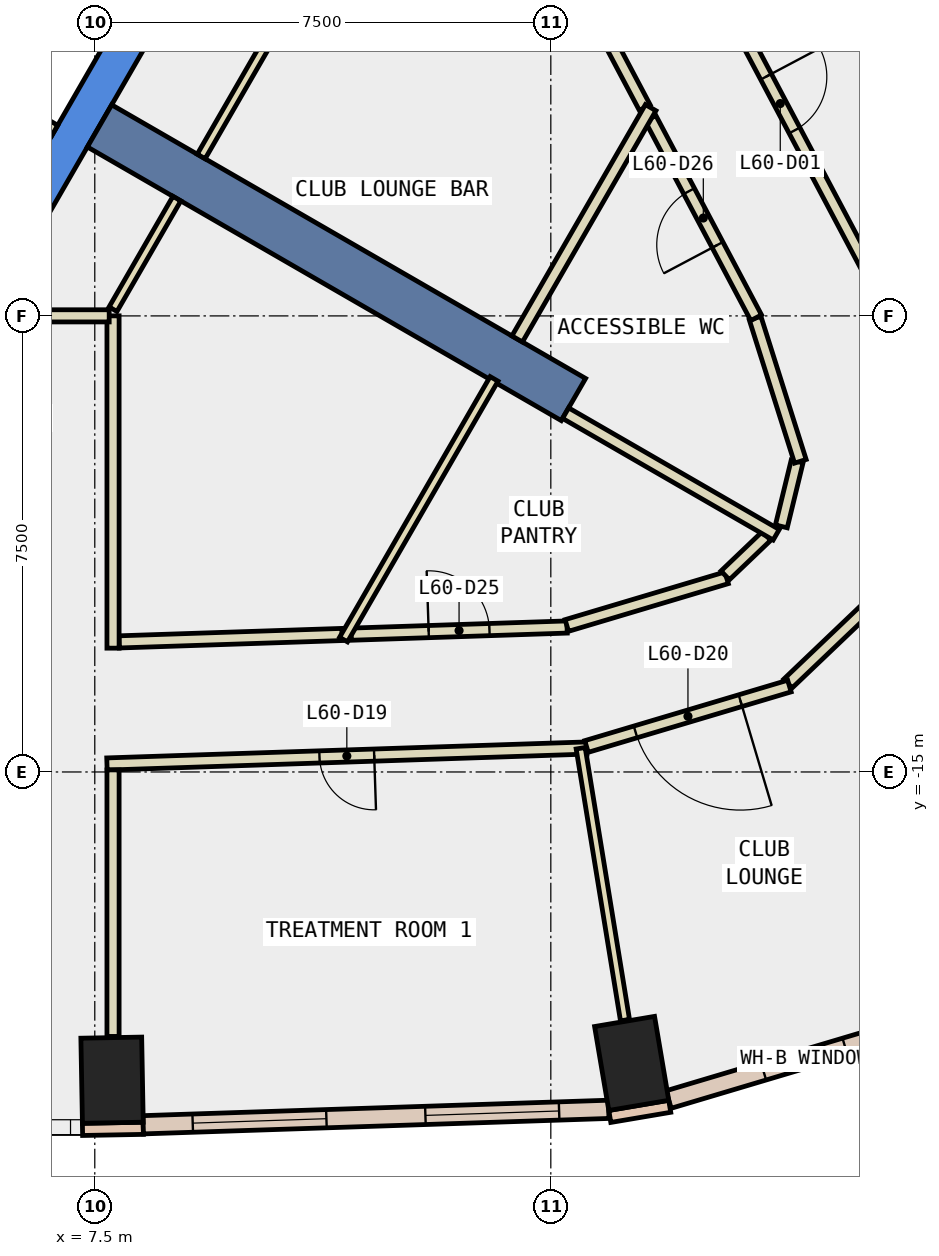
"""IFC4 building model, lengths in metres.
Left out: names, types, materials, properties, quantities, classifications, styles, units other than length and angle.
Written with IfcOpenShell. Run it as: python <this file> out.ifc"""

import sys

from ifc_helpers import new_model, si_unit, direction, frame, frame_2d, origin, origin_2d, place, context, subcontext, project, spatial, polyline, rectangle, outline, extrude, element, fill, save


model = new_model("IFC4")
c1 = context("Model", 3, precision=1e-05, world=origin(), true_north=direction((0.0, 1.0)))
c2 = subcontext(c1, "Body", "Model", "MODEL_VIEW")
j1 = project(units=[si_unit("LENGTHUNIT", "METRE"), si_unit("PLANEANGLEUNIT", "RADIAN")], contexts=[c1])
p1 = place(None, origin())
s1 = spatial("IfcSite", under=j1, at=p1, CompositionType="ELEMENT")
p2 = place(p1, origin())
s2 = spatial("IfcBuilding", under=s1, at=p2, CompositionType="ELEMENT")
p3 = place(p2, frame((0.0, 0.0, 263.0)))
s3 = spatial("IfcBuildingStorey", under=s2, at=p3, CompositionType="ELEMENT", Elevation=263.0)
for number, where, z_axis, x_axis in (
    (1, (7.784, -20.069, -0.34), (0.0, 0.0, 1.0), (1.0, 0.018, 0.0)),
    (2, (16.33, -19.793, -0.34), (0.0, 0.0, 1.0), (0.986, 0.167, 0.0)),
):
    element("IfcColumn", number, at=place(p3, frame(where, z_axis=z_axis, x_axis=x_axis)), inside=s3, PredefinedType="COLUMN", context=c2, shape_type="SweptSolid", body=[
        extrude(rectangle(XDim=1.0, YDim=1.4, at=origin_2d()), origin(), (0.0, 0.0, 1.0), 3.6),
    ])
p4 = place(p3, frame((0.0, 0.0, -0.34)))
e3 = element("IfcWall", 3, at=p4, inside=s3, PredefinedType="SHEAR", context=c2, shape_type="SweptSolid", body=[
    extrude(outline(polyline([(5.774, -7.5), (11.547, 2.5), (10.854, 2.5), (5.427, -6.9), (5.774, -7.5)])), origin(), (0.0, 0.0, 1.0), 3.6),
])
p5 = place(p3, frame((7.578, -4.375, -0.34), z_axis=(0.0, 0.0, 1.0), x_axis=(0.866024315419, -0.5000018851, 0.0)))
e4 = element("IfcWall", 4, at=p5, inside=s3, PredefinedType="SHEAR", context=c2, shape_type="SweptSolid", body=[
    extrude(rectangle(XDim=9.0, YDim=0.8, at=frame_2d((4.5, 0.0))), origin(), (0.0, 0.0, 1.0), 3.6),
])
for number, where, z_axis, x_axis in (
    (5, (7.298, -20.878, 0.0), (0.0, 0.0, 1.0), (1.0, 0.018, 0.0)),
    (6, (15.97, -20.665, 0.0), (0.0, 0.0, 1.0), (0.986, 0.167, 0.0)),
):
    element("IfcWall", number, at=place(p3, frame(where, z_axis=z_axis, x_axis=x_axis)), inside=s3, PredefinedType="STANDARD", context=c2, shape_type="SweptSolid", body=[
        extrude(rectangle(XDim=1.0, YDim=0.2, at=frame_2d((0.5, 0.0))), origin(), (0.0, 0.0, 1.0), 3.26),
    ])
p6 = place(p3, frame((8.296, -20.802, 0.0), z_axis=(0.0, 0.0, 1.0), x_axis=(0.999450376985, 0.033150323459, 0.0)))
e7 = element("IfcWall", 7, at=p6, inside=s3, PredefinedType="STANDARD", context=c2, shape_type="SweptSolid", body=[
    extrude(rectangle(XDim=7.659, YDim=0.3, at=frame_2d((3.83, 0.0))), origin(), (0.0, 0.0, 1.0), 3.26),
])
p7 = place(p6, frame((0.815, 0.0, 0.9)))
e8 = element("IfcOpeningElement", 8, at=p7, cuts=e7, PredefinedType="OPENING", context=c2, shape_type="SweptSolid", body=[
    extrude(rectangle(XDim=2.2, YDim=2.0, at=frame_2d((1.1, 1.0))), frame((0.0, 0.16, 0.0), z_axis=(0.0, -1.0, 0.0), x_axis=(1.0, 0.0, 0.0)), (0.0, 0.0, 1.0), 0.32),
])
p8 = place(p6, frame((4.644, 0.0, 0.9)))
e9 = element("IfcOpeningElement", 9, at=p8, cuts=e7, PredefinedType="OPENING", context=c2, shape_type="SweptSolid", body=[
    extrude(rectangle(XDim=2.2, YDim=2.0, at=frame_2d((1.1, 1.0))), frame((0.0, 0.16, 0.0), z_axis=(0.0, -1.0, 0.0), x_axis=(1.0, 0.0, 0.0)), (0.0, 0.0, 1.0), 0.32),
])
p9 = place(p3, frame((16.937, -20.387, 0.0), z_axis=(0.0, 0.0, 1.0), x_axis=(0.958361270465, 0.285558532131, 0.0)))
e10 = element("IfcWall", 10, at=p9, inside=s3, PredefinedType="STANDARD", context=c2, shape_type="SweptSolid", body=[
    extrude(rectangle(XDim=4.658, YDim=0.3, at=frame_2d((2.329, 0.0))), origin(), (0.0, 0.0, 1.0), 3.26),
])
p10 = place(p9, frame((1.629, 0.0, 0.9)))
e11 = element("IfcOpeningElement", 11, at=p10, cuts=e10, PredefinedType="OPENING", context=c2, shape_type="SweptSolid", body=[
    extrude(rectangle(XDim=1.4, YDim=2.0, at=frame_2d((0.7, 1.0))), frame((0.0, 0.16, 0.0), z_axis=(0.0, -1.0, 0.0), x_axis=(1.0, 0.0, 0.0)), (0.0, 0.0, 1.0), 0.32),
])
p11 = place(p3, frame((7.9, -12.861, 0.0), z_axis=(0.0, 0.0, 1.0), x_axis=(0.999446088303, 0.033279371614, 0.0)))
e12 = element("IfcWall", 12, at=p11, inside=s3, PredefinedType="PARTITIONING", context=c2, shape_type="SweptSolid", body=[
    extrude(rectangle(XDim=3.668, YDim=0.2, at=frame_2d((1.834, 0.0))), origin(), (0.0, 0.0, 1.0), 3.26),
])
p12 = place(p3, frame((16.545, -4.074, 0.0), z_axis=(0.0, 0.0, 1.0), x_axis=(-0.468321873419, 0.883557934081, 0.0)))
e13 = element("IfcWall", 13, at=p12, inside=s3, PredefinedType="PARTITIONING", context=c2, shape_type="SweptSolid", body=[
    extrude(rectangle(XDim=2.093, YDim=0.2, at=frame_2d((1.046, 0.0))), origin(), (0.0, 0.0, 1.0), 3.26),
])
p13 = place(p3, frame((11.716, -12.734, 0.0), z_axis=(0.0, 0.0, 1.0), x_axis=(0.999449093602, 0.03318899362, 0.0)))
e14 = element("IfcWall", 14, at=p13, inside=s3, PredefinedType="PARTITIONING", context=c2, shape_type="SweptSolid", body=[
    extrude(rectangle(XDim=3.553, YDim=0.2, at=frame_2d((1.776, 0.0))), origin(), (0.0, 0.0, 1.0), 3.26),
])
p14 = place(p13, frame((1.276, 0.0, 0.0)))
e15 = element("IfcOpeningElement", 15, at=p14, cuts=e14, PredefinedType="OPENING", context=c2, shape_type="SweptSolid", body=[
    extrude(rectangle(XDim=1.0, YDim=2.1, at=frame_2d((0.5, 1.05))), frame((0.0, 0.11, 0.0), z_axis=(0.0, -1.0, 0.0), x_axis=(1.0, 0.0, 0.0)), (0.0, 0.0, 1.0), 0.22),
])
p15 = place(p3, frame((15.263, -12.591, 0.0), z_axis=(0.0, 0.0, 1.0), x_axis=(0.958253964342, 0.285918414628, 0.0)))
e16 = element("IfcWall", 16, at=p15, inside=s3, PredefinedType="PARTITIONING", context=c2, shape_type="SweptSolid", body=[
    extrude(rectangle(XDim=2.743, YDim=0.2, at=frame_2d((1.371, 0.0))), origin(), (0.0, 0.0, 1.0), 3.26),
])
p16 = place(p3, frame((17.868, -11.767, 0.0), z_axis=(0.0, 0.0, 1.0), x_axis=(0.723402701671, 0.690426340181, 0.0)))
e17 = element("IfcWall", 17, at=p16, inside=s3, PredefinedType="PARTITIONING", context=c2, shape_type="SweptSolid", body=[
    extrude(rectangle(XDim=0.94, YDim=0.2, at=frame_2d((0.47, 0.0))), origin(), (0.0, 0.0, 1.0), 3.26),
])
p17 = place(p3, frame((18.791, -10.961, 0.0), z_axis=(0.0, 0.0, 1.0), x_axis=(0.236572634589, 0.971613806285, 0.0)))
e18 = element("IfcWall", 18, at=p17, inside=s3, PredefinedType="PARTITIONING", context=c2, shape_type="SweptSolid", body=[
    extrude(rectangle(XDim=1.099, YDim=0.2, at=frame_2d((0.55, 0.0))), origin(), (0.0, 0.0, 1.0), 3.26),
])
p18 = place(p3, frame((19.104, -9.891, 0.0), z_axis=(0.0, 0.0, 1.0), x_axis=(-0.301325410186, 0.953521366922, 0.0)))
e19 = element("IfcWall", 19, at=p18, inside=s3, PredefinedType="PARTITIONING", context=c2, shape_type="SweptSolid", body=[
    extrude(rectangle(XDim=2.469, YDim=0.2, at=frame_2d((1.234, 0.0))), origin(), (0.0, 0.0, 1.0), 3.26),
])
p19 = place(p3, frame((18.377, -7.53, 0.0), z_axis=(0.0, 0.0, 1.0), x_axis=(-0.468214048123, 0.883615077474, 0.0)))
e20 = element("IfcWall", 20, at=p19, inside=s3, PredefinedType="PARTITIONING", context=c2, shape_type="SweptSolid", body=[
    extrude(rectangle(XDim=3.712, YDim=0.2, at=frame_2d((1.856, 0.0))), origin(), (0.0, 0.0, 1.0), 3.26),
])
p20 = place(p19, frame((1.356, 0.0, 0.0)))
e21 = element("IfcOpeningElement", 21, at=p20, cuts=e20, PredefinedType="OPENING", context=c2, shape_type="SweptSolid", body=[
    extrude(rectangle(XDim=1.0, YDim=2.1, at=frame_2d((0.5, 1.05))), frame((0.0, 0.11, 0.0), z_axis=(0.0, -1.0, 0.0), x_axis=(1.0, 0.0, 0.0)), (0.0, 0.0, 1.0), 0.22),
])
p21 = place(p3, frame((15.591, -14.606, 0.0), z_axis=(0.0, 0.0, 1.0), x_axis=(-0.999445318732, -0.03330247535, 0.0)))
e22 = element("IfcWall", 22, at=p21, inside=s3, PredefinedType="PARTITIONING", context=c2, shape_type="SweptSolid", body=[
    extrude(rectangle(XDim=7.896, YDim=0.2, at=frame_2d((3.948, 0.0))), origin(), (0.0, 0.0, 1.0), 3.26),
])
p22 = place(p21, frame((3.498, 0.0, 0.0)))
e23 = element("IfcOpeningElement", 23, at=p22, cuts=e22, PredefinedType="OPENING", context=c2, shape_type="SweptSolid", body=[
    extrude(rectangle(XDim=0.9, YDim=2.1, at=frame_2d((0.45, 1.05))), frame((0.0, 0.11, 0.0), z_axis=(0.0, -1.0, 0.0), x_axis=(1.0, 0.0, 0.0)), (0.0, 0.0, 1.0), 0.22),
])
p23 = place(p3, frame((20.692, -11.837, 0.0), z_axis=(0.0, 0.0, 1.0), x_axis=(-0.723668833869, -0.690147389248, 0.0)))
e24 = element("IfcWall", 24, at=p23, inside=s3, PredefinedType="PARTITIONING", context=c2, shape_type="SweptSolid", body=[
    extrude(rectangle(XDim=2.476, YDim=0.2, at=frame_2d((1.238, 0.0))), origin(), (0.0, 0.0, 1.0), 3.26),
])
p24 = place(p3, frame((18.924, -13.587, 0.0), z_axis=(0.0, 0.0, 1.0), x_axis=(-0.958378336681, -0.285501250052, 0.0)))
e25 = element("IfcWall", 25, at=p24, inside=s3, PredefinedType="PARTITIONING", context=c2, shape_type="SweptSolid", body=[
    extrude(rectangle(XDim=3.482, YDim=0.2, at=frame_2d((1.741, 0.0))), origin(), (0.0, 0.0, 1.0), 3.26),
])
p25 = place(p24, frame((0.841, 0.0, 0.0)))
e26 = element("IfcOpeningElement", 26, at=p25, cuts=e25, PredefinedType="OPENING", context=c2, shape_type="SweptSolid", body=[
    extrude(rectangle(XDim=1.8, YDim=2.1, at=frame_2d((0.9, 1.05))), frame((0.0, 0.11, 0.0), z_axis=(0.0, -1.0, 0.0), x_axis=(1.0, 0.0, 0.0)), (0.0, 0.0, 1.0), 0.22),
])
p26 = place(p3, frame((17.318, -1.262, 0.0), z_axis=(0.0, 0.0, 1.0), x_axis=(0.468313568794, -0.883562335822, 0.0)))
e27 = element("IfcWall", 27, at=p26, inside=s3, PredefinedType="PARTITIONING", context=c2, shape_type="SweptSolid", body=[
    extrude(rectangle(XDim=6.216, YDim=0.2, at=frame_2d((3.108, 0.0))), origin(), (0.0, 0.0, 1.0), 3.26),
])
p27 = place(p26, frame((2.608, 0.0, 0.0)))
e28 = element("IfcOpeningElement", 28, at=p27, cuts=e27, PredefinedType="OPENING", context=c2, shape_type="SweptSolid", body=[
    extrude(rectangle(XDim=1.0, YDim=2.1, at=frame_2d((0.5, 1.05))), frame((0.0, 0.11, 0.0), z_axis=(0.0, -1.0, 0.0), x_axis=(1.0, 0.0, 0.0)), (0.0, 0.0, 1.0), 0.22),
])
p28 = place(p3, frame((5.751, -3.938, 0.0), z_axis=(0.0, 0.0, 1.0), x_axis=(0.500034260056, 0.866005622828, 0.0)))
e29 = element("IfcWall", 29, at=p28, inside=s3, PredefinedType="PARTITIONING", context=c2, shape_type="SweptSolid", body=[
    extrude(rectangle(XDim=5.399, YDim=0.2, at=frame_2d((2.7, 0.0))), origin(), (0.0, 0.0, 1.0), 3.26),
])
p29 = place(p3, frame((6.841, -4.452, 0.0), z_axis=(0.0, 0.0, 1.0), x_axis=(-0.86621513555, 0.499671230855, 0.0)))
e30 = element("IfcWall", 30, at=p29, inside=s3, PredefinedType="PARTITIONING", context=c2, shape_type="SweptSolid", body=[
    extrude(rectangle(XDim=1.1, YDim=0.2, at=frame_2d((0.55, 0.0))), origin(), (0.0, 0.0, 1.0), 3.26),
])
p30 = place(p3, frame((7.8, -7.39, 0.0), z_axis=(0.0, 0.0, 1.0), x_axis=(0.499977374825, 0.866038466041, 0.0)))
e31 = element("IfcWall", 31, at=p30, inside=s3, PredefinedType="PARTITIONING", context=c2, shape_type="SweptSolid", body=[
    extrude(rectangle(XDim=2.1, YDim=0.15, at=frame_2d((1.05, 0.0))), origin(), (0.0, 0.0, 1.0), 3.26),
])
p31 = place(p3, frame((7.8, -7.499, 0.0), z_axis=(0.0, 0.0, 1.0), x_axis=(0.0, -1.0, 0.0)))
e32 = element("IfcWall", 32, at=p31, inside=s3, PredefinedType="PARTITIONING", context=c2, shape_type="SweptSolid", body=[
    extrude(rectangle(XDim=5.465, YDim=0.2, at=frame_2d((2.732, 0.0))), origin(), (0.0, 0.0, 1.0), 3.26),
])
p32 = place(p3, frame((7.8, -14.966, 0.0), z_axis=(0.0, 0.0, 1.0), x_axis=(0.0, -1.0, 0.0)))
e33 = element("IfcWall", 33, at=p32, inside=s3, PredefinedType="PARTITIONING", context=c2, shape_type="SweptSolid", body=[
    extrude(rectangle(XDim=4.383, YDim=0.2, at=frame_2d((2.191, 0.0))), origin(), (0.0, 0.0, 1.0), 3.26),
])
p33 = place(p3, frame((14.067, -8.536, 0.0), z_axis=(0.0, 0.0, 1.0), x_axis=(-0.500100941679, -0.865967117235, 0.0)))
e34 = element("IfcWall", 34, at=p33, inside=s3, PredefinedType="PARTITIONING", context=c2, shape_type="SweptSolid", body=[
    extrude(rectangle(XDim=4.951, YDim=0.15, at=frame_2d((2.475, 0.0))), origin(), (0.0, 0.0, 1.0), 3.26),
])
p34 = place(p3, frame((16.642, -4.075, 0.0), z_axis=(0.0, 0.0, 1.0), x_axis=(-0.49980426207, -0.866138383641, 0.0)))
e35 = element("IfcWall", 35, at=p34, inside=s3, PredefinedType="PARTITIONING", context=c2, shape_type="SweptSolid", body=[
    extrude(rectangle(XDim=4.392, YDim=0.2, at=frame_2d((2.196, 0.0))), origin(), (0.0, 0.0, 1.0), 3.26),
])
p35 = place(p3, frame((15.243, -9.099, 0.0), z_axis=(0.0, 0.0, 1.0), x_axis=(0.866026010844, -0.49999894854, 0.0)))
e36 = element("IfcWall", 36, at=p35, inside=s3, PredefinedType="PARTITIONING", context=c2, shape_type="SweptSolid", body=[
    extrude(rectangle(XDim=4.0, YDim=0.2, at=frame_2d((2.0, 0.0))), origin(), (0.0, 0.0, 1.0), 3.26),
])
p36 = place(p3, frame((15.491, -14.61, 0.0), z_axis=(0.0, 0.0, 1.0), x_axis=(0.160928343418, -0.986966092774, 0.0)))
e37 = element("IfcWall", 37, at=p36, inside=s3, PredefinedType="PARTITIONING", context=c2, shape_type="SweptSolid", body=[
    extrude(rectangle(XDim=4.53, YDim=0.15, at=frame_2d((2.265, 0.0))), origin(), (0.0, 0.0, 1.0), 3.26),
])
p37 = place(p3, frame((9.25, -4.878, 0.0), z_axis=(0.0, 0.0, 1.0), x_axis=(0.499982416899, 0.866035555154, 0.0)))
e38 = element("IfcWall", 38, at=p37, inside=s3, PredefinedType="PARTITIONING", context=c2, shape_type="SweptSolid", body=[
    extrude(rectangle(XDim=8.048, YDim=0.15, at=frame_2d((4.024, 0.0))), origin(), (0.0, 0.0, 1.0), 3.26),
])
p38 = place(p3, frame((5.944, -7.499, 0.0), z_axis=(0.0, 0.0, 1.0), x_axis=(1.0, 0.0, 0.0)))
e39 = element("IfcWall", 39, at=p38, inside=s3, PredefinedType="PARTITIONING", context=c2, shape_type="SweptSolid", body=[
    extrude(rectangle(XDim=1.793, YDim=0.2, at=frame_2d((0.896, 0.0))), origin(), (0.0, 0.0, 1.0), 3.26),
])
p39 = place(p3, frame((5.492, -3.788, 0.0), z_axis=(0.0, 0.0, 1.0), x_axis=(0.500034260056, 0.866005622828, 0.0)))
e40 = element("IfcWall", 40, at=p39, inside=s3, PredefinedType="STANDARD", context=c2, shape_type="SweptSolid", body=[
    extrude(rectangle(XDim=5.399, YDim=0.2, at=frame_2d((2.7, 0.0))), origin(), (0.0, 0.0, 1.0), 3.26),
])
p40 = place(p7, origin())
e41 = element("IfcWindow", 41, at=p40, inside=s3, PartitioningType="SINGLE_PANEL", PredefinedType="WINDOW", context=c2, shape_type="SweptSolid", body=[
    extrude(rectangle(XDim=2.2, YDim=2.0, at=frame_2d((1.1, 1.0))), frame((0.0, 0.03, 0.0), z_axis=(0.0, -1.0, 0.0), x_axis=(1.0, 0.0, 0.0)), (0.0, 0.0, 1.0), 0.06),
])
fill(e8, e41)
p41 = place(p8, origin())
e42 = element("IfcWindow", 42, at=p41, inside=s3, PartitioningType="SINGLE_PANEL", PredefinedType="WINDOW", context=c2, shape_type="SweptSolid", body=[
    extrude(rectangle(XDim=2.2, YDim=2.0, at=frame_2d((1.1, 1.0))), frame((0.0, 0.03, 0.0), z_axis=(0.0, -1.0, 0.0), x_axis=(1.0, 0.0, 0.0)), (0.0, 0.0, 1.0), 0.06),
])
fill(e9, e42)
p42 = place(p10, origin())
e43 = element("IfcWindow", 43, at=p42, inside=s3, PartitioningType="SINGLE_PANEL", PredefinedType="WINDOW", context=c2, shape_type="SweptSolid", body=[
    extrude(rectangle(XDim=1.4, YDim=2.0, at=frame_2d((0.7, 1.0))), frame((0.0, 0.03, 0.0), z_axis=(0.0, -1.0, 0.0), x_axis=(1.0, 0.0, 0.0)), (0.0, 0.0, 1.0), 0.06),
])
fill(e11, e43)
p43 = place(p27, origin())
e44 = element("IfcDoor", 44, at=p43, inside=s3, OperationType="SINGLE_SWING_LEFT", PredefinedType="DOOR", context=c2, shape_type="SweptSolid", body=[
    extrude(rectangle(XDim=1.0, YDim=2.1, at=frame_2d((0.5, 1.05))), frame((0.0, 0.025, 0.0), z_axis=(0.0, -1.0, 0.0), x_axis=(1.0, 0.0, 0.0)), (0.0, 0.0, 1.0), 0.05),
])
fill(e28, e44)
p44 = place(p22, origin())
e45 = element("IfcDoor", 45, at=p44, inside=s3, OperationType="SINGLE_SWING_LEFT", PredefinedType="DOOR", context=c2, shape_type="SweptSolid", body=[
    extrude(rectangle(XDim=0.9, YDim=2.1, at=frame_2d((0.45, 1.05))), frame((0.0, 0.025, 0.0), z_axis=(0.0, -1.0, 0.0), x_axis=(1.0, 0.0, 0.0)), (0.0, 0.0, 1.0), 0.05),
])
fill(e23, e45)
p45 = place(p25, origin())
e46 = element("IfcDoor", 46, at=p45, inside=s3, OperationType="DOUBLE_DOOR_SINGLE_SWING", PredefinedType="DOOR", context=c2, shape_type="SweptSolid", body=[
    extrude(rectangle(XDim=1.8, YDim=2.1, at=frame_2d((0.9, 1.05))), frame((0.0, 0.025, 0.0), z_axis=(0.0, -1.0, 0.0), x_axis=(1.0, 0.0, 0.0)), (0.0, 0.0, 1.0), 0.05),
])
fill(e26, e46)
p46 = place(p14, origin())
e47 = element("IfcDoor", 47, at=p46, inside=s3, OperationType="SINGLE_SWING_LEFT", PredefinedType="DOOR", context=c2, shape_type="SweptSolid", body=[
    extrude(rectangle(XDim=1.0, YDim=2.1, at=frame_2d((0.5, 1.05))), frame((0.0, 0.025, 0.0), z_axis=(0.0, -1.0, 0.0), x_axis=(1.0, 0.0, 0.0)), (0.0, 0.0, 1.0), 0.05),
])
fill(e15, e47)
p47 = place(p20, origin())
e48 = element("IfcDoor", 48, at=p47, inside=s3, OperationType="SINGLE_SWING_RIGHT", PredefinedType="DOOR", context=c2, shape_type="SweptSolid", body=[
    extrude(rectangle(XDim=1.0, YDim=2.1, at=frame_2d((0.5, 1.05))), frame((0.0, 0.025, 0.0), z_axis=(0.0, -1.0, 0.0), x_axis=(1.0, 0.0, 0.0)), (0.0, 0.0, 1.0), 0.05),
])
fill(e21, e48)
save(model, sys.argv[1])
